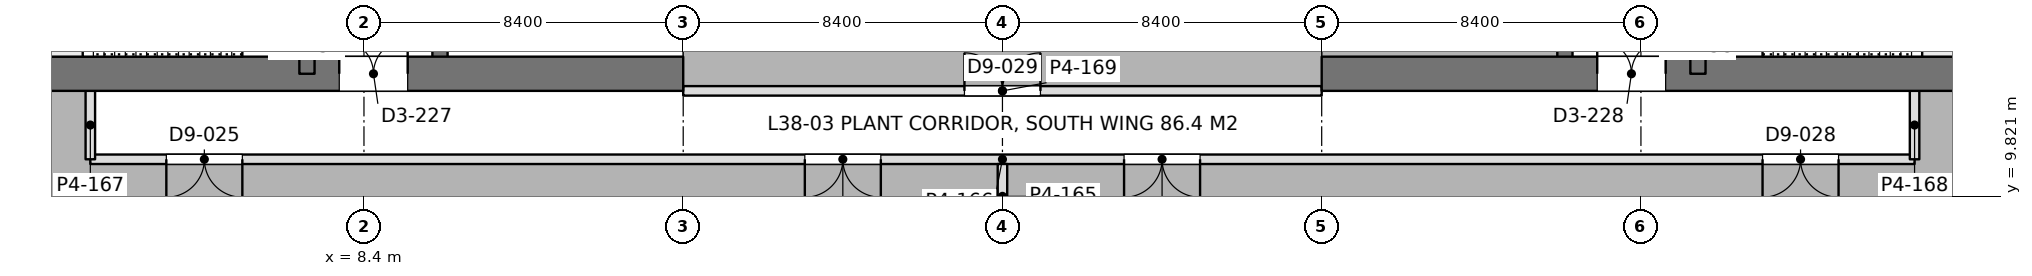
"""IFC4 building model, lengths in metres.
Left out: names, types, materials, properties, quantities, classifications, styles, units other than length and angle.
Written with IfcOpenShell. Run it as: python <this file> out.ifc"""

import sys

from ifc_helpers import new_model, si_unit, direction, frame, frame_2d, origin, place, context, subcontext, project, spatial, rectangle, extrude, element, fill, save


model = new_model("IFC4")
c1 = context("Model", 3, precision=1e-05, world=origin(), true_north=direction((0.0, 1.0)))
c2 = subcontext(c1, "Body", "Model", "MODEL_VIEW")
j1 = project(units=[si_unit("LENGTHUNIT", "METRE"), si_unit("PLANEANGLEUNIT", "RADIAN")], contexts=[c1])
p1 = place(None, origin())
s1 = spatial("IfcSite", under=j1, at=p1, CompositionType="ELEMENT")
p2 = place(p1, origin())
s2 = spatial("IfcBuilding", under=s1, at=p2, CompositionType="ELEMENT")
p3 = place(p2, frame((0.0, 0.0, 168.0)))
s3 = spatial("IfcBuildingStorey", under=s2, at=p3, CompositionType="ELEMENT", Elevation=168.0)
p4 = place(p3, frame((-1.2, 13.05, 0.0), z_axis=(0.0, 0.0, 1.0), x_axis=(1.0, 0.0, 0.0)))
e1 = element("IfcWall", 1, at=p4, inside=s3, PredefinedType="SHEAR", context=c2, shape_type="SweptSolid", body=[
    extrude(rectangle(XDim=18.0, YDim=0.9, at=frame_2d((9.0, 0.0))), origin(), (0.0, 0.0, 1.0), 5.4),
])
p5 = place(p4, frame((8.95, 0.0, 0.0)))
e2 = element("IfcOpeningElement", 2, at=p5, cuts=e1, PredefinedType="OPENING", context=c2, shape_type="SweptSolid", body=[
    extrude(rectangle(XDim=1.8, YDim=2.4, at=frame_2d((0.9, 1.2))), frame((0.0, 0.46, 0.0), z_axis=(0.0, -1.0, 0.0), x_axis=(1.0, 0.0, 0.0)), (0.0, 0.0, 1.0), 0.92),
])
p6 = place(p3, frame((6.9, 13.05, 0.0), z_axis=(0.0, 0.0, 1.0), x_axis=(0.0, 1.0, 0.0)))
e3 = element("IfcWall", 3, at=p6, inside=s3, PredefinedType="SHEAR", context=c2, shape_type="SweptSolid", body=[
    extrude(rectangle(XDim=24.3, YDim=0.4, at=frame_2d((12.15, 0.0))), origin(), (0.0, 0.0, 1.0), 5.4),
])
p7 = place(p6, frame((1.3, 0.0, 0.0)))
e4 = element("IfcOpeningElement", 4, at=p7, cuts=e3, PredefinedType="OPENING", context=c2, shape_type="SweptSolid", body=[
    extrude(rectangle(XDim=1.0, YDim=2.2, at=frame_2d((0.5, 1.1))), frame((0.0, 0.21, 0.0), z_axis=(0.0, -1.0, 0.0), x_axis=(1.0, 0.0, 0.0)), (0.0, 0.0, 1.0), 0.42),
])
p8 = place(p6, frame((22.0, 0.0, 0.0)))
e5 = element("IfcOpeningElement", 5, at=p8, cuts=e3, PredefinedType="OPENING", context=c2, shape_type="SweptSolid", body=[
    extrude(rectangle(XDim=1.0, YDim=2.2, at=frame_2d((0.5, 1.1))), frame((0.0, 0.21, 0.0), z_axis=(0.0, -1.0, 0.0), x_axis=(1.0, 0.0, 0.0)), (0.0, 0.0, 1.0), 0.42),
])
p9 = place(p6, frame((5.55, 0.0, 0.0)))
e6 = element("IfcOpeningElement", 6, at=p9, cuts=e3, PredefinedType="OPENING", context=c2, shape_type="SweptSolid", body=[
    extrude(rectangle(XDim=1.0, YDim=2.2, at=frame_2d((0.5, 1.1))), frame((0.0, 0.21, 0.0), z_axis=(0.0, -1.0, 0.0), x_axis=(1.0, 0.0, 0.0)), (0.0, 0.0, 1.0), 0.42),
])
p10 = place(p6, frame((9.55, 0.0, 0.0)))
e7 = element("IfcOpeningElement", 7, at=p10, cuts=e3, PredefinedType="OPENING", context=c2, shape_type="SweptSolid", body=[
    extrude(rectangle(XDim=1.0, YDim=2.2, at=frame_2d((0.5, 1.1))), frame((0.0, 0.21, 0.0), z_axis=(0.0, -1.0, 0.0), x_axis=(1.0, 0.0, 0.0)), (0.0, 0.0, 1.0), 0.42),
])
p11 = place(p6, frame((12.8, 0.0, 0.0)))
e8 = element("IfcOpeningElement", 8, at=p11, cuts=e3, PredefinedType="OPENING", context=c2, shape_type="SweptSolid", body=[
    extrude(rectangle(XDim=1.1, YDim=2.2, at=frame_2d((0.55, 1.1))), frame((0.0, 0.21, 0.0), z_axis=(0.0, -1.0, 0.0), x_axis=(1.0, 0.0, 0.0)), (0.0, 0.0, 1.0), 0.42),
])
p12 = place(p6, frame((15.538, 0.0, 0.0)))
e9 = element("IfcOpeningElement", 9, at=p12, cuts=e3, PredefinedType="OPENING", context=c2, shape_type="SweptSolid", body=[
    extrude(rectangle(XDim=1.1, YDim=2.2, at=frame_2d((0.55, 1.1))), frame((0.0, 0.21, 0.0), z_axis=(0.0, -1.0, 0.0), x_axis=(1.0, 0.0, 0.0)), (0.0, 0.0, 1.0), 0.42),
])
p13 = place(p6, frame((18.262, 0.0, 0.0)))
e10 = element("IfcOpeningElement", 10, at=p13, cuts=e3, PredefinedType="OPENING", context=c2, shape_type="SweptSolid", body=[
    extrude(rectangle(XDim=1.1, YDim=2.2, at=frame_2d((0.55, 1.1))), frame((0.0, 0.21, 0.0), z_axis=(0.0, -1.0, 0.0), x_axis=(1.0, 0.0, 0.0)), (0.0, 0.0, 1.0), 0.42),
])
p14 = place(p3, frame((10.4, 13.05, 0.0), z_axis=(0.0, 0.0, 1.0), x_axis=(0.0, 1.0, 0.0)))
e11 = element("IfcWall", 11, at=p14, inside=s3, PredefinedType="SHEAR", context=c2, shape_type="SweptSolid", body=[
    extrude(rectangle(XDim=24.3, YDim=0.4, at=frame_2d((12.15, 0.0))), origin(), (0.0, 0.0, 1.0), 5.4),
])
p15 = place(p14, frame((10.05, 0.0, 0.0)))
e12 = element("IfcOpeningElement", 12, at=p15, cuts=e11, PredefinedType="OPENING", context=c2, shape_type="SweptSolid", body=[
    extrude(rectangle(XDim=1.1, YDim=2.2, at=frame_2d((0.55, 1.1))), frame((0.0, 0.21, 0.0), z_axis=(0.0, -1.0, 0.0), x_axis=(1.0, 0.0, 0.0)), (0.0, 0.0, 1.0), 0.42),
])
p16 = place(p14, frame((12.9, 0.0, 0.0)))
e13 = element("IfcOpeningElement", 13, at=p16, cuts=e11, PredefinedType="OPENING", context=c2, shape_type="SweptSolid", body=[
    extrude(rectangle(XDim=1.1, YDim=2.2, at=frame_2d((0.55, 1.1))), frame((0.0, 0.21, 0.0), z_axis=(0.0, -1.0, 0.0), x_axis=(1.0, 0.0, 0.0)), (0.0, 0.0, 1.0), 0.42),
])
p17 = place(p14, frame((21.45, 0.0, 0.0)))
e14 = element("IfcOpeningElement", 14, at=p17, cuts=e11, PredefinedType="OPENING", context=c2, shape_type="SweptSolid", body=[
    extrude(rectangle(XDim=1.1, YDim=2.2, at=frame_2d((0.55, 1.1))), frame((0.0, 0.21, 0.0), z_axis=(0.0, -1.0, 0.0), x_axis=(1.0, 0.0, 0.0)), (0.0, 0.0, 1.0), 0.42),
])
p18 = place(p14, frame((5.8, 0.0, 0.0)))
e15 = element("IfcOpeningElement", 15, at=p18, cuts=e11, PredefinedType="OPENING", context=c2, shape_type="SweptSolid", body=[
    extrude(rectangle(XDim=1.8, YDim=2.4, at=frame_2d((0.9, 1.2))), frame((0.0, 0.21, 0.0), z_axis=(0.0, -1.0, 0.0), x_axis=(1.0, 0.0, 0.0)), (0.0, 0.0, 1.0), 0.42),
])
p19 = place(p14, frame((1.05, 0.0, 0.0)))
e16 = element("IfcOpeningElement", 16, at=p19, cuts=e11, PredefinedType="OPENING", context=c2, shape_type="SweptSolid", body=[
    extrude(rectangle(XDim=1.8, YDim=2.4, at=frame_2d((0.9, 1.2))), frame((0.0, 0.21, 0.0), z_axis=(0.0, -1.0, 0.0), x_axis=(1.0, 0.0, 0.0)), (0.0, 0.0, 1.0), 0.42),
])
p20 = place(p3, frame((33.6, 13.05, 0.0), z_axis=(0.0, 0.0, 1.0), x_axis=(1.0, 0.0, 0.0)))
e17 = element("IfcWall", 17, at=p20, inside=s3, PredefinedType="SHEAR", context=c2, shape_type="SweptSolid", body=[
    extrude(rectangle(XDim=18.0, YDim=0.9, at=frame_2d((9.0, 0.0))), origin(), (0.0, 0.0, 1.0), 5.4),
])
p21 = place(p20, frame((7.25, 0.0, 0.0)))
e18 = element("IfcOpeningElement", 18, at=p21, cuts=e17, PredefinedType="OPENING", context=c2, shape_type="SweptSolid", body=[
    extrude(rectangle(XDim=1.8, YDim=2.4, at=frame_2d((0.9, 1.2))), frame((0.0, 0.46, 0.0), z_axis=(0.0, -1.0, 0.0), x_axis=(1.0, 0.0, 0.0)), (0.0, 0.0, 1.0), 0.92),
])
p22 = place(p3, frame((43.5, 13.05, 0.0), z_axis=(0.0, 0.0, 1.0), x_axis=(0.0, 1.0, 0.0)))
e19 = element("IfcWall", 19, at=p22, inside=s3, PredefinedType="SHEAR", context=c2, shape_type="SweptSolid", body=[
    extrude(rectangle(XDim=24.3, YDim=0.4, at=frame_2d((12.15, 0.0))), origin(), (0.0, 0.0, 1.0), 5.4),
])
p23 = place(p22, frame((1.3, 0.0, 0.0)))
e20 = element("IfcOpeningElement", 20, at=p23, cuts=e19, PredefinedType="OPENING", context=c2, shape_type="SweptSolid", body=[
    extrude(rectangle(XDim=1.0, YDim=2.2, at=frame_2d((0.5, 1.1))), frame((0.0, 0.21, 0.0), z_axis=(0.0, -1.0, 0.0), x_axis=(1.0, 0.0, 0.0)), (0.0, 0.0, 1.0), 0.42),
])
p24 = place(p22, frame((22.0, 0.0, 0.0)))
e21 = element("IfcOpeningElement", 21, at=p24, cuts=e19, PredefinedType="OPENING", context=c2, shape_type="SweptSolid", body=[
    extrude(rectangle(XDim=1.0, YDim=2.2, at=frame_2d((0.5, 1.1))), frame((0.0, 0.21, 0.0), z_axis=(0.0, -1.0, 0.0), x_axis=(1.0, 0.0, 0.0)), (0.0, 0.0, 1.0), 0.42),
])
p25 = place(p22, frame((5.55, 0.0, 0.0)))
e22 = element("IfcOpeningElement", 22, at=p25, cuts=e19, PredefinedType="OPENING", context=c2, shape_type="SweptSolid", body=[
    extrude(rectangle(XDim=1.0, YDim=2.2, at=frame_2d((0.5, 1.1))), frame((0.0, 0.21, 0.0), z_axis=(0.0, -1.0, 0.0), x_axis=(1.0, 0.0, 0.0)), (0.0, 0.0, 1.0), 0.42),
])
p26 = place(p22, frame((9.55, 0.0, 0.0)))
e23 = element("IfcOpeningElement", 23, at=p26, cuts=e19, PredefinedType="OPENING", context=c2, shape_type="SweptSolid", body=[
    extrude(rectangle(XDim=1.0, YDim=2.2, at=frame_2d((0.5, 1.1))), frame((0.0, 0.21, 0.0), z_axis=(0.0, -1.0, 0.0), x_axis=(1.0, 0.0, 0.0)), (0.0, 0.0, 1.0), 0.42),
])
p27 = place(p22, frame((12.8, 0.0, 0.0)))
e24 = element("IfcOpeningElement", 24, at=p27, cuts=e19, PredefinedType="OPENING", context=c2, shape_type="SweptSolid", body=[
    extrude(rectangle(XDim=1.1, YDim=2.2, at=frame_2d((0.55, 1.1))), frame((0.0, 0.21, 0.0), z_axis=(0.0, -1.0, 0.0), x_axis=(1.0, 0.0, 0.0)), (0.0, 0.0, 1.0), 0.42),
])
p28 = place(p22, frame((15.538, 0.0, 0.0)))
e25 = element("IfcOpeningElement", 25, at=p28, cuts=e19, PredefinedType="OPENING", context=c2, shape_type="SweptSolid", body=[
    extrude(rectangle(XDim=1.1, YDim=2.2, at=frame_2d((0.55, 1.1))), frame((0.0, 0.21, 0.0), z_axis=(0.0, -1.0, 0.0), x_axis=(1.0, 0.0, 0.0)), (0.0, 0.0, 1.0), 0.42),
])
p29 = place(p22, frame((18.262, 0.0, 0.0)))
e26 = element("IfcOpeningElement", 26, at=p29, cuts=e19, PredefinedType="OPENING", context=c2, shape_type="SweptSolid", body=[
    extrude(rectangle(XDim=1.1, YDim=2.2, at=frame_2d((0.55, 1.1))), frame((0.0, 0.21, 0.0), z_axis=(0.0, -1.0, 0.0), x_axis=(1.0, 0.0, 0.0)), (0.0, 0.0, 1.0), 0.42),
])
p30 = place(p3, frame((40.0, 13.05, 0.0), z_axis=(0.0, 0.0, 1.0), x_axis=(0.0, 1.0, 0.0)))
e27 = element("IfcWall", 27, at=p30, inside=s3, PredefinedType="SHEAR", context=c2, shape_type="SweptSolid", body=[
    extrude(rectangle(XDim=24.3, YDim=0.4, at=frame_2d((12.15, 0.0))), origin(), (0.0, 0.0, 1.0), 5.4),
])
p31 = place(p30, frame((10.05, 0.0, 0.0)))
e28 = element("IfcOpeningElement", 28, at=p31, cuts=e27, PredefinedType="OPENING", context=c2, shape_type="SweptSolid", body=[
    extrude(rectangle(XDim=1.1, YDim=2.2, at=frame_2d((0.55, 1.1))), frame((0.0, 0.21, 0.0), z_axis=(0.0, -1.0, 0.0), x_axis=(1.0, 0.0, 0.0)), (0.0, 0.0, 1.0), 0.42),
])
p32 = place(p30, frame((12.9, 0.0, 0.0)))
e29 = element("IfcOpeningElement", 29, at=p32, cuts=e27, PredefinedType="OPENING", context=c2, shape_type="SweptSolid", body=[
    extrude(rectangle(XDim=1.1, YDim=2.2, at=frame_2d((0.55, 1.1))), frame((0.0, 0.21, 0.0), z_axis=(0.0, -1.0, 0.0), x_axis=(1.0, 0.0, 0.0)), (0.0, 0.0, 1.0), 0.42),
])
p33 = place(p30, frame((21.45, 0.0, 0.0)))
e30 = element("IfcOpeningElement", 30, at=p33, cuts=e27, PredefinedType="OPENING", context=c2, shape_type="SweptSolid", body=[
    extrude(rectangle(XDim=1.1, YDim=2.2, at=frame_2d((0.55, 1.1))), frame((0.0, 0.21, 0.0), z_axis=(0.0, -1.0, 0.0), x_axis=(1.0, 0.0, 0.0)), (0.0, 0.0, 1.0), 0.42),
])
p34 = place(p30, frame((6.1, 0.0, 0.0)))
e31 = element("IfcOpeningElement", 31, at=p34, cuts=e27, PredefinedType="OPENING", context=c2, shape_type="SweptSolid", body=[
    extrude(rectangle(XDim=1.8, YDim=2.4, at=frame_2d((0.9, 1.2))), frame((0.0, 0.21, 0.0), z_axis=(0.0, -1.0, 0.0), x_axis=(1.0, 0.0, 0.0)), (0.0, 0.0, 1.0), 0.42),
])
p35 = place(p30, frame((1.35, 0.0, 0.0)))
e32 = element("IfcOpeningElement", 32, at=p35, cuts=e27, PredefinedType="OPENING", context=c2, shape_type="SweptSolid", body=[
    extrude(rectangle(XDim=1.8, YDim=2.4, at=frame_2d((0.9, 1.2))), frame((0.0, 0.21, 0.0), z_axis=(0.0, -1.0, 0.0), x_axis=(1.0, 0.0, 0.0)), (0.0, 0.0, 1.0), 0.42),
])
p36 = place(p3, frame((1.2, 10.8, 0.0), z_axis=(0.0, 0.0, 1.0), x_axis=(1.0, 0.0, 0.0)))
e33 = element("IfcWall", 33, at=p36, inside=s3, PredefinedType="PARTITIONING", context=c2, shape_type="SweptSolid", body=[
    extrude(rectangle(XDim=48.0, YDim=0.25, at=frame_2d((24.0, 0.0))), origin(), (0.0, 0.0, 1.0), 4.725),
])
p37 = place(p36, frame((2.0, 0.0, 0.0)))
e34 = element("IfcOpeningElement", 34, at=p37, cuts=e33, PredefinedType="OPENING", context=c2, shape_type="SweptSolid", body=[
    extrude(rectangle(XDim=2.0, YDim=2.4, at=frame_2d((1.0, 1.2))), frame((0.0, 0.135, 0.0), z_axis=(0.0, -1.0, 0.0), x_axis=(1.0, 0.0, 0.0)), (0.0, 0.0, 1.0), 0.27),
])
p38 = place(p36, frame((18.8, 0.0, 0.0)))
e35 = element("IfcOpeningElement", 35, at=p38, cuts=e33, PredefinedType="OPENING", context=c2, shape_type="SweptSolid", body=[
    extrude(rectangle(XDim=2.0, YDim=2.4, at=frame_2d((1.0, 1.2))), frame((0.0, 0.135, 0.0), z_axis=(0.0, -1.0, 0.0), x_axis=(1.0, 0.0, 0.0)), (0.0, 0.0, 1.0), 0.27),
])
p39 = place(p36, frame((27.2, 0.0, 0.0)))
e36 = element("IfcOpeningElement", 36, at=p39, cuts=e33, PredefinedType="OPENING", context=c2, shape_type="SweptSolid", body=[
    extrude(rectangle(XDim=2.0, YDim=2.4, at=frame_2d((1.0, 1.2))), frame((0.0, 0.135, 0.0), z_axis=(0.0, -1.0, 0.0), x_axis=(1.0, 0.0, 0.0)), (0.0, 0.0, 1.0), 0.27),
])
p40 = place(p36, frame((44.0, 0.0, 0.0)))
e37 = element("IfcOpeningElement", 37, at=p40, cuts=e33, PredefinedType="OPENING", context=c2, shape_type="SweptSolid", body=[
    extrude(rectangle(XDim=2.0, YDim=2.4, at=frame_2d((1.0, 1.2))), frame((0.0, 0.135, 0.0), z_axis=(0.0, -1.0, 0.0), x_axis=(1.0, 0.0, 0.0)), (0.0, 0.0, 1.0), 0.27),
])
for number, where, z_axis, x_axis in (
    (38, (1.2, 10.8, 0.0), (0.0, 0.0, 1.0), (0.0, 1.0, 0.0)),
    (39, (49.2, 10.8, 0.0), (0.0, 0.0, 1.0), (0.0, 1.0, 0.0)),
):
    element("IfcWall", number, at=place(p3, frame(where, z_axis=z_axis, x_axis=x_axis)), inside=s3, PredefinedType="PARTITIONING", context=c2, shape_type="SweptSolid", body=[
        extrude(rectangle(XDim=1.802, YDim=0.25, at=frame_2d((0.901, 0.0))), origin(), (0.0, 0.0, 1.0), 5.25),
    ])
p41 = place(p3, frame((25.2, 8.974, 0.0), z_axis=(0.0, 0.0, 1.0), x_axis=(0.0, 1.0, 0.0)))
e40 = element("IfcWall", 40, at=p41, inside=s3, PredefinedType="PARTITIONING", context=c2, shape_type="SweptSolid", body=[
    extrude(rectangle(XDim=1.702, YDim=0.25, at=frame_2d((0.851, 0.0))), origin(), (0.0, 0.0, 1.0), 4.75),
])
p42 = place(p3, frame((16.8, 12.6, 0.0), z_axis=(0.0, 0.0, 1.0), x_axis=(1.0, 0.0, 0.0)))
e41 = element("IfcWall", 41, at=p42, inside=s3, PredefinedType="PARTITIONING", context=c2, shape_type="SweptSolid", body=[
    extrude(rectangle(XDim=16.8, YDim=0.25, at=frame_2d((8.4, 0.0))), origin(), (0.0, 0.0, 1.0), 4.725),
])
p43 = place(p42, frame((7.4, 0.0, 0.0)))
e42 = element("IfcOpeningElement", 42, at=p43, cuts=e41, PredefinedType="OPENING", context=c2, shape_type="SweptSolid", body=[
    extrude(rectangle(XDim=2.0, YDim=2.4, at=frame_2d((1.0, 1.2))), frame((0.0, 0.135, 0.0), z_axis=(0.0, -1.0, 0.0), x_axis=(1.0, 0.0, 0.0)), (0.0, 0.0, 1.0), 0.27),
])
p44 = place(p5, origin())
e43 = element("IfcDoor", 43, at=p44, inside=s3, OperationType="DOUBLE_DOOR_SINGLE_SWING", PredefinedType="DOOR", context=c2, shape_type="SweptSolid", body=[
    extrude(rectangle(XDim=1.8, YDim=2.4, at=frame_2d((0.9, 1.2))), frame((0.0, 0.025, 0.0), z_axis=(0.0, -1.0, 0.0), x_axis=(1.0, 0.0, 0.0)), (0.0, 0.0, 1.0), 0.05),
])
fill(e2, e43)
p45 = place(p21, origin())
e44 = element("IfcDoor", 44, at=p45, inside=s3, OperationType="DOUBLE_DOOR_SINGLE_SWING", PredefinedType="DOOR", context=c2, shape_type="SweptSolid", body=[
    extrude(rectangle(XDim=1.8, YDim=2.4, at=frame_2d((0.9, 1.2))), frame((0.0, 0.025, 0.0), z_axis=(0.0, -1.0, 0.0), x_axis=(1.0, 0.0, 0.0)), (0.0, 0.0, 1.0), 0.05),
])
fill(e18, e44)
p46 = place(p37, frame((2.0, 0.0, 0.0), z_axis=(0.0, 0.0, 1.0), x_axis=(-1.0, 0.0, 0.0)))
e45 = element("IfcDoor", 45, at=p46, inside=s3, OperationType="DOUBLE_DOOR_SINGLE_SWING", PredefinedType="DOOR", context=c2, shape_type="SweptSolid", body=[
    extrude(rectangle(XDim=2.0, YDim=2.4, at=frame_2d((1.0, 1.2))), frame((0.0, 0.025, 0.0), z_axis=(0.0, -1.0, 0.0), x_axis=(1.0, 0.0, 0.0)), (0.0, 0.0, 1.0), 0.05),
])
fill(e34, e45)
p47 = place(p38, frame((2.0, 0.0, 0.0), z_axis=(0.0, 0.0, 1.0), x_axis=(-1.0, 0.0, 0.0)))
e46 = element("IfcDoor", 46, at=p47, inside=s3, OperationType="DOUBLE_DOOR_SINGLE_SWING", PredefinedType="DOOR", context=c2, shape_type="SweptSolid", body=[
    extrude(rectangle(XDim=2.0, YDim=2.4, at=frame_2d((1.0, 1.2))), frame((0.0, 0.025, 0.0), z_axis=(0.0, -1.0, 0.0), x_axis=(1.0, 0.0, 0.0)), (0.0, 0.0, 1.0), 0.05),
])
fill(e35, e46)
p48 = place(p39, frame((2.0, 0.0, 0.0), z_axis=(0.0, 0.0, 1.0), x_axis=(-1.0, 0.0, 0.0)))
e47 = element("IfcDoor", 47, at=p48, inside=s3, OperationType="DOUBLE_DOOR_SINGLE_SWING", PredefinedType="DOOR", context=c2, shape_type="SweptSolid", body=[
    extrude(rectangle(XDim=2.0, YDim=2.4, at=frame_2d((1.0, 1.2))), frame((0.0, 0.025, 0.0), z_axis=(0.0, -1.0, 0.0), x_axis=(1.0, 0.0, 0.0)), (0.0, 0.0, 1.0), 0.05),
])
fill(e36, e47)
p49 = place(p40, frame((2.0, 0.0, 0.0), z_axis=(0.0, 0.0, 1.0), x_axis=(-1.0, 0.0, 0.0)))
e48 = element("IfcDoor", 48, at=p49, inside=s3, OperationType="DOUBLE_DOOR_SINGLE_SWING", PredefinedType="DOOR", context=c2, shape_type="SweptSolid", body=[
    extrude(rectangle(XDim=2.0, YDim=2.4, at=frame_2d((1.0, 1.2))), frame((0.0, 0.025, 0.0), z_axis=(0.0, -1.0, 0.0), x_axis=(1.0, 0.0, 0.0)), (0.0, 0.0, 1.0), 0.05),
])
fill(e37, e48)
p50 = place(p43, origin())
e49 = element("IfcDoor", 49, at=p50, inside=s3, OperationType="DOUBLE_DOOR_SINGLE_SWING", PredefinedType="DOOR", context=c2, shape_type="SweptSolid", body=[
    extrude(rectangle(XDim=2.0, YDim=2.4, at=frame_2d((1.0, 1.2))), frame((0.0, 0.025, 0.0), z_axis=(0.0, -1.0, 0.0), x_axis=(1.0, 0.0, 0.0)), (0.0, 0.0, 1.0), 0.05),
])
fill(e42, e49)
save(model, sys.argv[1])
